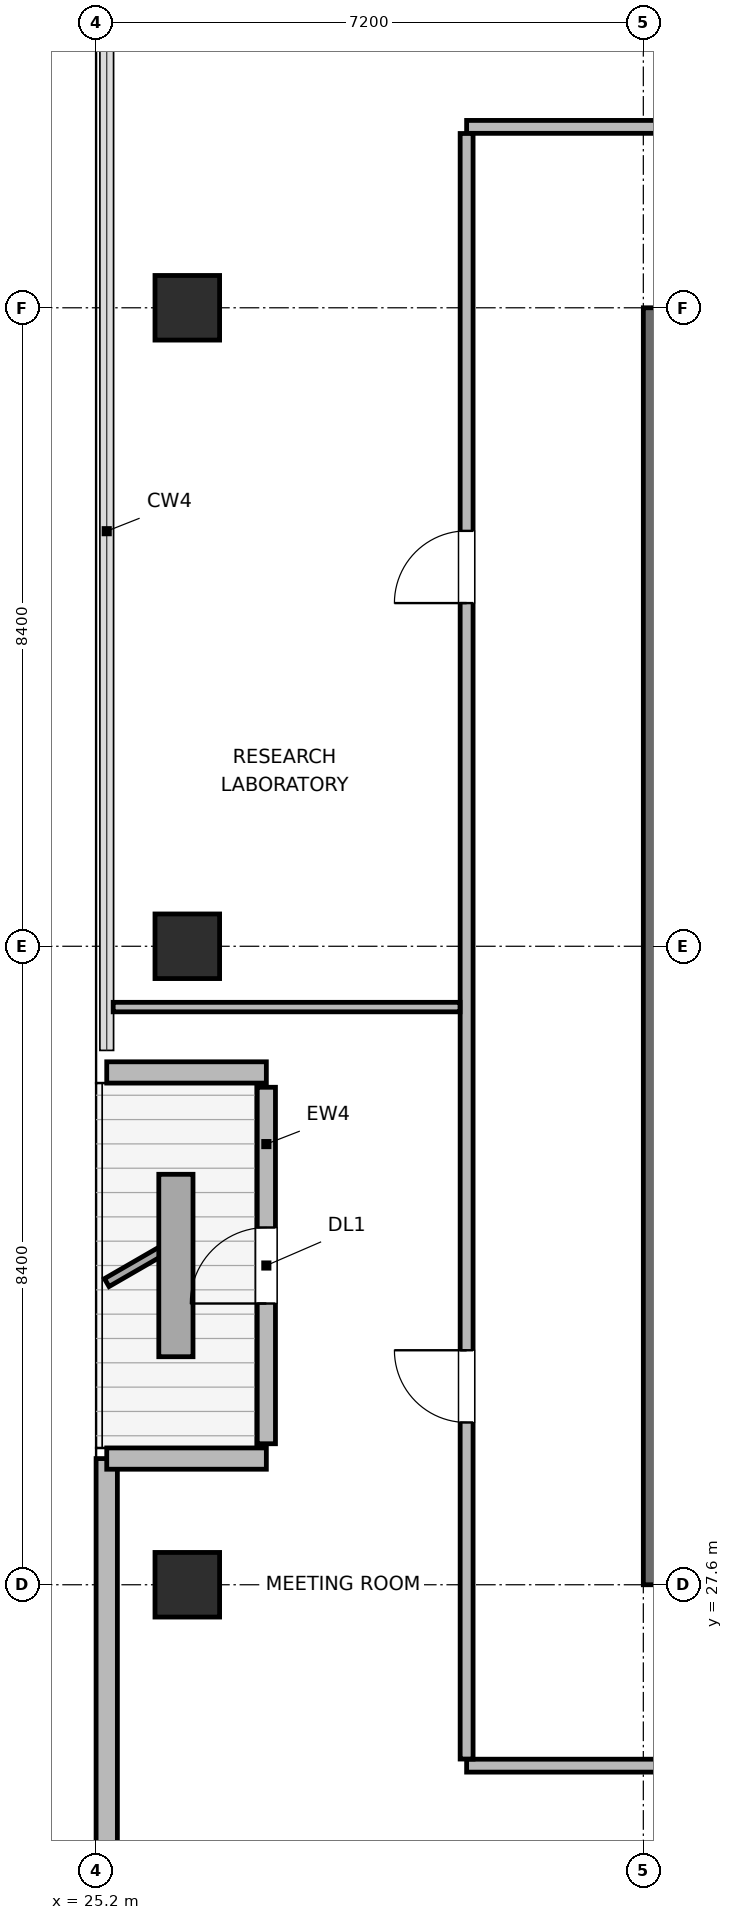
"""IFC4 building model, lengths in metres.
Left out: names, types, materials, properties, quantities, classifications, styles, units other than length and angle.
Written with IfcOpenShell. Run it as: python <this file> out.ifc"""

import sys

from ifc_helpers import new_model, si_unit, direction, frame, frame_2d, origin, origin_2d, place, context, subcontext, project, spatial, rectangle, extrude, element, fill, save


model = new_model("IFC4")
c1 = context("Model", 3, precision=1e-05, world=origin(), true_north=direction((0.0, 1.0)))
c2 = subcontext(c1, "Body", "Model", "MODEL_VIEW")
j1 = project(units=[si_unit("LENGTHUNIT", "METRE"), si_unit("PLANEANGLEUNIT", "RADIAN")], contexts=[c1])
p1 = place(None, origin())
s1 = spatial("IfcSite", under=j1, at=p1, CompositionType="ELEMENT")
p2 = place(p1, origin())
s2 = spatial("IfcBuilding", under=s1, at=p2, CompositionType="ELEMENT")
p3 = place(p2, frame((0.0, 0.0, 337.5)))
s3 = spatial("IfcBuildingStorey", under=s2, at=p3, CompositionType="ELEMENT", Elevation=337.5)
p4 = place(p3, frame((32.65, 27.6, 0.0), z_axis=(0.0, 0.0, 1.0), x_axis=(0.0, 1.0, 0.0)))
e1 = element("IfcWall", 1, at=p4, inside=s3, PredefinedType="SHEAR", context=c2, shape_type="SweptSolid", body=[
    extrude(rectangle(XDim=16.8, YDim=0.5, at=frame_2d((8.4, 0.0))), origin(), (0.0, 0.0, 1.0), 4.5),
])
for number, where, z_axis, x_axis in (
    (2, (26.4, 27.6, 0.0), (0.0, 0.0, 1.0), (1.0, 0.0, 0.0)),
    (3, (26.4, 36.0, 0.0), (0.0, 0.0, 1.0), (1.0, 0.0, 0.0)),
    (4, (26.4, 44.4, 0.0), (0.0, 0.0, 1.0), (1.0, 0.0, 0.0)),
):
    element("IfcColumn", number, at=place(p3, frame(where, z_axis=z_axis, x_axis=x_axis)), inside=s3, PredefinedType="COLUMN", context=c2, shape_type="SweptSolid", body=[
        extrude(rectangle(XDim=0.85, YDim=0.85, at=origin_2d()), origin(), (0.0, 0.0, 1.0), 4.5),
    ])
p5 = place(p3, frame((25.34, 23.418, 0.0), z_axis=(0.0, 0.0, 1.0), x_axis=(0.0, 1.0, 0.0)))
e5 = element("IfcWall", 5, at=p5, inside=s3, PredefinedType="SOLIDWALL", context=c2, shape_type="SweptSolid", body=[
    extrude(rectangle(XDim=5.842, YDim=0.28, at=frame_2d((2.921, 0.0))), origin(), (0.0, 0.0, 1.0), 4.28),
])
p6 = place(p3, frame((25.34, 29.26, 0.0), z_axis=(0.0, 0.0, 1.0), x_axis=(1.0, 0.0, 0.0)))
e6 = element("IfcWall", 6, at=p6, inside=s3, PredefinedType="SOLIDWALL", context=c2, shape_type="SweptSolid", body=[
    extrude(rectangle(XDim=2.1, YDim=0.28, at=frame_2d((1.05, 0.0))), origin(), (0.0, 0.0, 1.0), 3.726),
])
p7 = place(p3, frame((27.44, 29.455, 0.0), z_axis=(0.0, 0.0, 1.0), x_axis=(0.0, 1.0, 0.0)))
e7 = element("IfcWall", 7, at=p7, inside=s3, PredefinedType="SOLIDWALL", context=c2, shape_type="SweptSolid", body=[
    extrude(rectangle(XDim=4.69, YDim=0.24, at=frame_2d((2.345, 0.0))), origin(), (0.0, 0.0, 1.0), 3.911),
])
p8 = place(p7, frame((1.845, 0.0, 0.0)))
e8 = element("IfcOpeningElement", 8, at=p8, cuts=e7, PredefinedType="OPENING", context=c2, shape_type="SweptSolid", body=[
    extrude(rectangle(XDim=1.0, YDim=2.02, at=frame_2d((0.5, 1.01))), frame((0.0, 0.13, 0.0), z_axis=(0.0, -1.0, 0.0), x_axis=(1.0, 0.0, 0.0)), (0.0, 0.0, 1.0), 0.26),
])
p9 = place(p3, frame((27.44, 34.34, 0.0), z_axis=(0.0, 0.0, 1.0), x_axis=(-1.0, 0.0, 0.0)))
e9 = element("IfcWall", 9, at=p9, inside=s3, PredefinedType="SOLIDWALL", context=c2, shape_type="SweptSolid", body=[
    extrude(rectangle(XDim=2.1, YDim=0.28, at=frame_2d((1.05, 0.0))), origin(), (0.0, 0.0, 1.0), 3.726),
])
p10 = place(p3, frame((30.075, 25.22, 0.0), z_axis=(0.0, 0.0, 1.0), x_axis=(1.0, 0.0, 0.0)))
e10 = element("IfcWall", 10, at=p10, inside=s3, PredefinedType="PARTITIONING", context=c2, shape_type="SweptSolid", body=[
    extrude(rectangle(XDim=33.525, YDim=0.17, at=frame_2d((16.763, 0.0))), origin(), (0.0, 0.0, 1.0), 4.28),
])
p11 = place(p10, frame((4.018, 0.0, 0.0)))
e11 = element("IfcOpeningElement", 11, at=p11, cuts=e10, PredefinedType="OPENING", context=c2, shape_type="SweptSolid", body=[
    extrude(rectangle(XDim=0.95, YDim=2.04, at=frame_2d((0.475, 1.02))), frame((0.0, 0.095, 0.0), z_axis=(0.0, -1.0, 0.0), x_axis=(1.0, 0.0, 0.0)), (0.0, 0.0, 1.0), 0.19),
])
p12 = place(p10, frame((12.4, 0.0, 0.0)))
e12 = element("IfcOpeningElement", 12, at=p12, cuts=e10, PredefinedType="OPENING", context=c2, shape_type="SweptSolid", body=[
    extrude(rectangle(XDim=0.95, YDim=2.04, at=frame_2d((0.475, 1.02))), frame((0.0, 0.095, 0.0), z_axis=(0.0, -1.0, 0.0), x_axis=(1.0, 0.0, 0.0)), (0.0, 0.0, 1.0), 0.19),
])
p13 = place(p10, frame((20.18, 0.0, 0.0)))
e13 = element("IfcOpeningElement", 13, at=p13, cuts=e10, PredefinedType="OPENING", context=c2, shape_type="SweptSolid", body=[
    extrude(rectangle(XDim=0.95, YDim=2.04, at=frame_2d((0.475, 1.02))), frame((0.0, 0.095, 0.0), z_axis=(0.0, -1.0, 0.0), x_axis=(1.0, 0.0, 0.0)), (0.0, 0.0, 1.0), 0.19),
])
p14 = place(p10, frame((28.56, 0.0, 0.0)))
e14 = element("IfcOpeningElement", 14, at=p14, cuts=e10, PredefinedType="OPENING", context=c2, shape_type="SweptSolid", body=[
    extrude(rectangle(XDim=0.95, YDim=2.04, at=frame_2d((0.475, 1.02))), frame((0.0, 0.095, 0.0), z_axis=(0.0, -1.0, 0.0), x_axis=(1.0, 0.0, 0.0)), (0.0, 0.0, 1.0), 0.19),
])
p15 = place(p3, frame((30.075, 46.78, 0.0), z_axis=(0.0, 0.0, 1.0), x_axis=(1.0, 0.0, 0.0)))
e15 = element("IfcWall", 15, at=p15, inside=s3, PredefinedType="PARTITIONING", context=c2, shape_type="SweptSolid", body=[
    extrude(rectangle(XDim=33.525, YDim=0.17, at=frame_2d((16.763, 0.0))), origin(), (0.0, 0.0, 1.0), 4.28),
])
p16 = place(p15, frame((3.852, 0.0, 0.0)))
e16 = element("IfcOpeningElement", 16, at=p16, cuts=e15, PredefinedType="OPENING", context=c2, shape_type="SweptSolid", body=[
    extrude(rectangle(XDim=0.95, YDim=2.04, at=frame_2d((0.475, 1.02))), frame((0.0, 0.095, 0.0), z_axis=(0.0, -1.0, 0.0), x_axis=(1.0, 0.0, 0.0)), (0.0, 0.0, 1.0), 0.19),
])
p17 = place(p15, frame((20.615, 0.0, 0.0)))
e17 = element("IfcOpeningElement", 17, at=p17, cuts=e15, PredefinedType="OPENING", context=c2, shape_type="SweptSolid", body=[
    extrude(rectangle(XDim=0.95, YDim=2.04, at=frame_2d((0.475, 1.02))), frame((0.0, 0.095, 0.0), z_axis=(0.0, -1.0, 0.0), x_axis=(1.0, 0.0, 0.0)), (0.0, 0.0, 1.0), 0.19),
])
p18 = place(p3, frame((30.075, 25.307, 0.0), z_axis=(0.0, 0.0, 1.0), x_axis=(0.0, 1.0, 0.0)))
e18 = element("IfcWall", 18, at=p18, inside=s3, PredefinedType="PARTITIONING", context=c2, shape_type="SweptSolid", body=[
    extrude(rectangle(XDim=21.386, YDim=0.17, at=frame_2d((10.693, 0.0))), origin(), (0.0, 0.0, 1.0), 4.28),
])
p19 = place(p18, frame((4.428, 0.0, 0.0)))
e19 = element("IfcOpeningElement", 19, at=p19, cuts=e18, PredefinedType="OPENING", context=c2, shape_type="SweptSolid", body=[
    extrude(rectangle(XDim=0.95, YDim=2.04, at=frame_2d((0.475, 1.02))), frame((0.0, 0.095, 0.0), z_axis=(0.0, -1.0, 0.0), x_axis=(1.0, 0.0, 0.0)), (0.0, 0.0, 1.0), 0.19),
])
p20 = place(p18, frame((15.208, 0.0, 0.0)))
e20 = element("IfcOpeningElement", 20, at=p20, cuts=e18, PredefinedType="OPENING", context=c2, shape_type="SweptSolid", body=[
    extrude(rectangle(XDim=0.95, YDim=2.04, at=frame_2d((0.475, 1.02))), frame((0.0, 0.095, 0.0), z_axis=(0.0, -1.0, 0.0), x_axis=(1.0, 0.0, 0.0)), (0.0, 0.0, 1.0), 0.19),
])
p21 = place(p3, frame((25.425, 35.2, 0.0), z_axis=(0.0, 0.0, 1.0), x_axis=(1.0, 0.0, 0.0)))
e21 = element("IfcWall", 21, at=p21, inside=s3, PredefinedType="PARTITIONING", context=c2, shape_type="SweptSolid", body=[
    extrude(rectangle(XDim=4.563, YDim=0.125, at=frame_2d((2.281, 0.0))), origin(), (0.0, 0.0, 1.0), 4.28),
])
p22 = place(p8, origin())
e22 = element("IfcDoor", 22, at=p22, inside=s3, OperationType="SINGLE_SWING_LEFT", PredefinedType="DOOR", context=c2, shape_type="SweptSolid", body=[
    extrude(rectangle(XDim=1.0, YDim=2.02, at=frame_2d((0.5, 1.01))), frame((0.0, 0.025, 0.0), z_axis=(0.0, -1.0, 0.0), x_axis=(1.0, 0.0, 0.0)), (0.0, 0.0, 1.0), 0.05),
])
fill(e8, e22)
p23 = place(p19, origin())
e23 = element("IfcDoor", 23, at=p23, inside=s3, OperationType="SINGLE_SWING_RIGHT", PredefinedType="DOOR", context=c2, shape_type="SweptSolid", body=[
    extrude(rectangle(XDim=0.95, YDim=2.04, at=frame_2d((0.475, 1.02))), frame((0.0, 0.025, 0.0), z_axis=(0.0, -1.0, 0.0), x_axis=(1.0, 0.0, 0.0)), (0.0, 0.0, 1.0), 0.05),
])
fill(e19, e23)
p24 = place(p20, origin())
e24 = element("IfcDoor", 24, at=p24, inside=s3, OperationType="SINGLE_SWING_LEFT", PredefinedType="DOOR", context=c2, shape_type="SweptSolid", body=[
    extrude(rectangle(XDim=0.95, YDim=2.04, at=frame_2d((0.475, 1.02))), frame((0.0, 0.025, 0.0), z_axis=(0.0, -1.0, 0.0), x_axis=(1.0, 0.0, 0.0)), (0.0, 0.0, 1.0), 0.05),
])
fill(e20, e24)
save(model, sys.argv[1])
